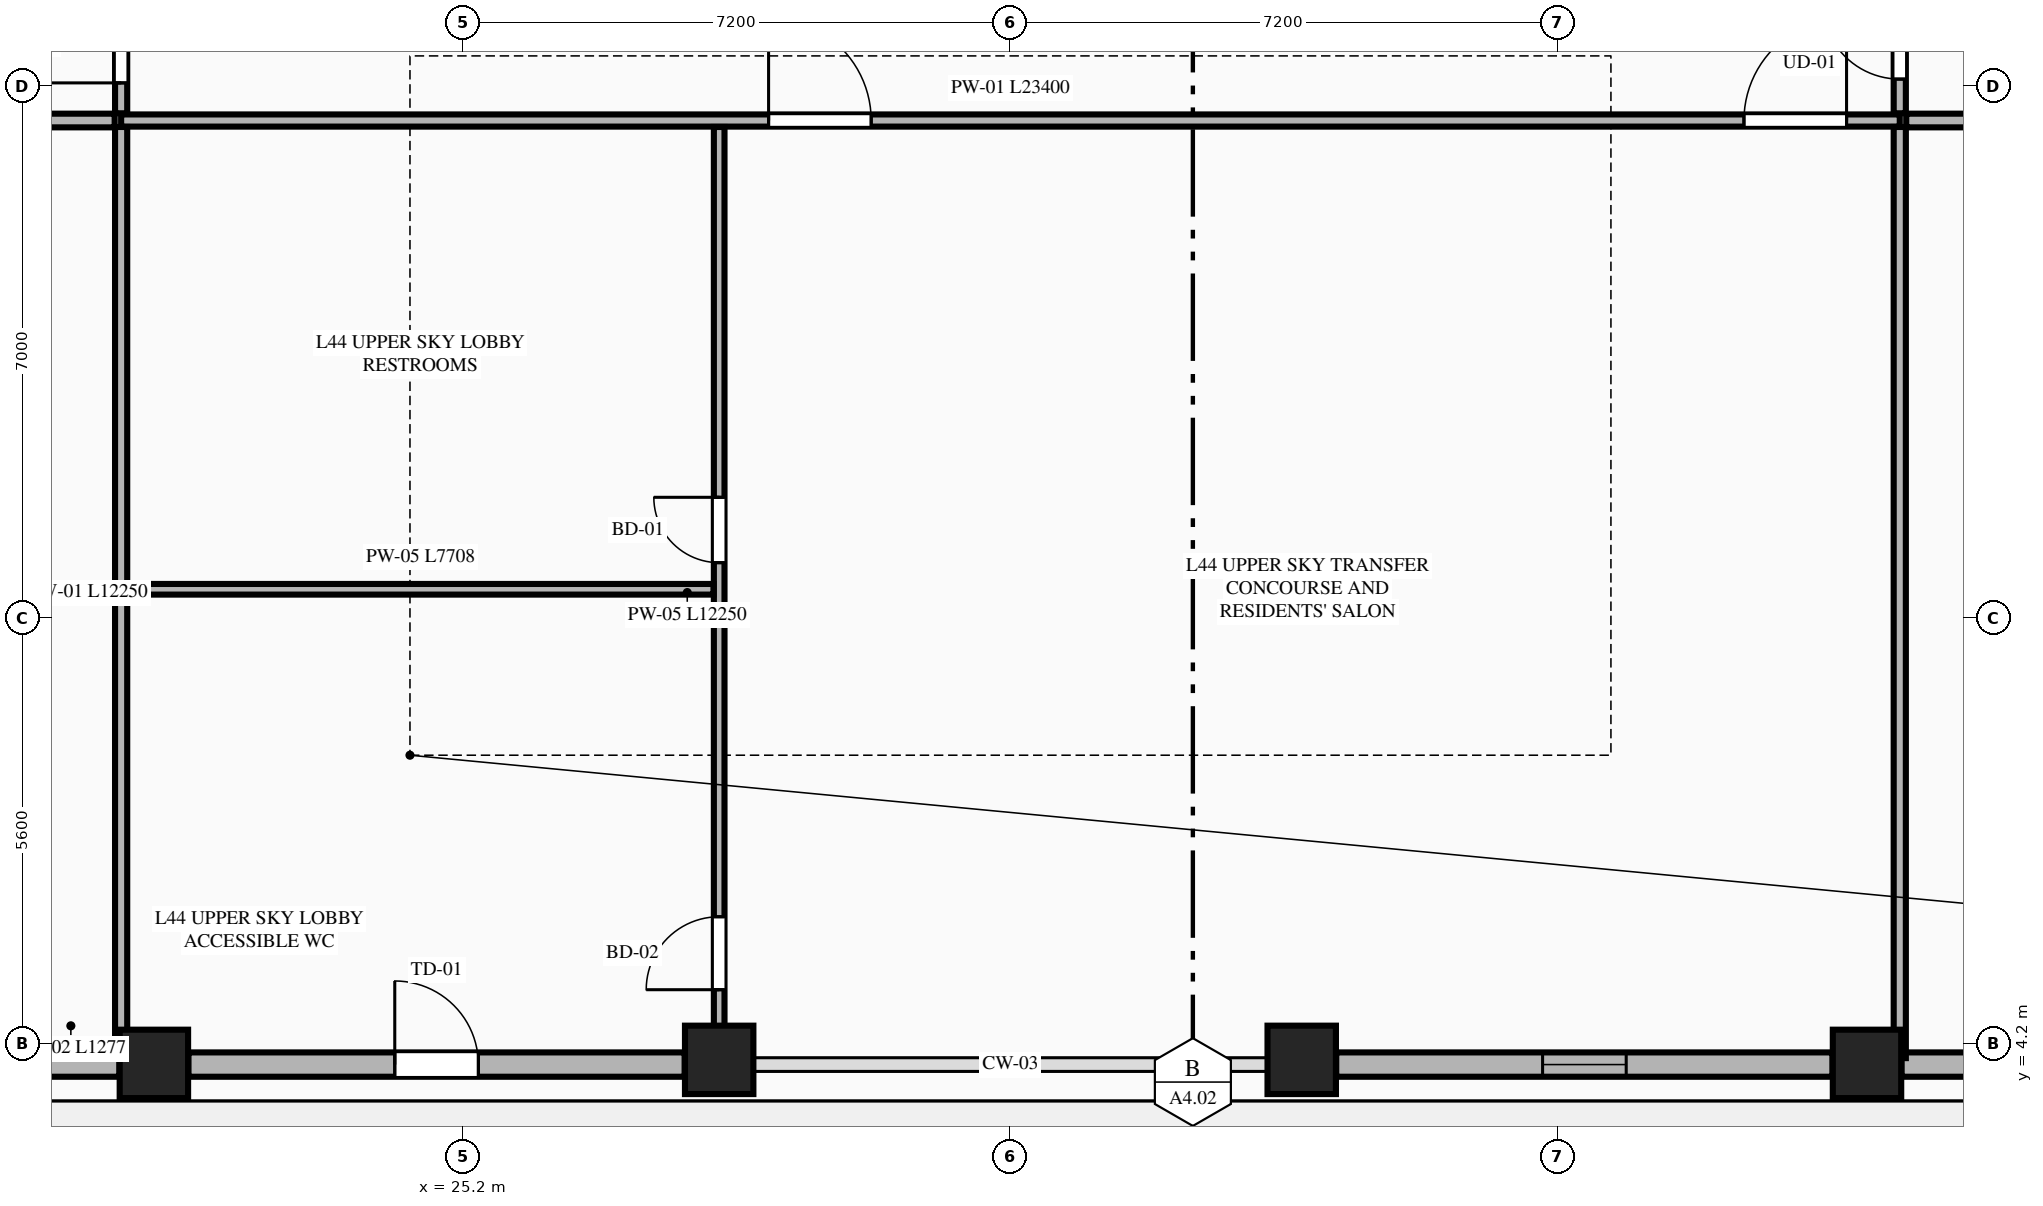
"""IFC4 building model, lengths in metres.
Left out: names, types, materials, properties, quantities, classifications, styles, units other than length and angle.
Written with IfcOpenShell. Run it as: python <this file> out.ifc"""

import sys

from ifc_helpers import new_model, si_unit, direction, frame, frame_2d, origin, origin_2d, place, context, subcontext, project, spatial, rectangle, extrude, element, fill, save


model = new_model("IFC4")
c1 = context("Model", 3, precision=1e-05, world=origin(), true_north=direction((0.0, 1.0)))
c2 = subcontext(c1, "Body", "Model", "MODEL_VIEW")
j1 = project(units=[si_unit("LENGTHUNIT", "METRE"), si_unit("PLANEANGLEUNIT", "RADIAN")], contexts=[c1])
p1 = place(None, origin())
s1 = spatial("IfcSite", under=j1, at=p1, CompositionType="ELEMENT")
p2 = place(p1, origin())
s2 = spatial("IfcBuilding", under=s1, at=p2, CompositionType="ELEMENT")
p3 = place(p2, frame((0.0, 0.0, 167.7)))
s3 = spatial("IfcBuildingStorey", under=s2, at=p3, CompositionType="ELEMENT", Elevation=167.7)
for number, where, z_axis, x_axis in (
    (1, (21.131, 3.939, 0.0), (0.0, 0.0, 1.0), (1.0, 0.0, 0.0)),
    (2, (28.568, 3.992, 0.0), (0.0, 0.0, 1.0), (1.0, 0.0, 0.0)),
    (3, (36.232, 3.992, 0.0), (0.0, 0.0, 1.0), (1.0, 0.0, 0.0)),
    (4, (43.669, 3.939, 0.0), (0.0, 0.0, 1.0), (1.0, 0.0, 0.0)),
):
    element("IfcColumn", number, at=place(p3, frame(where, z_axis=z_axis, x_axis=x_axis)), inside=s3, PredefinedType="COLUMN", context=c2, shape_type="SweptSolid", body=[
        extrude(rectangle(XDim=0.9, YDim=0.9, at=origin_2d()), origin(), (0.0, 0.0, 1.0), 4.2),
    ])
p4 = place(p3, frame((19.4, 3.93, 0.0), z_axis=(0.0, 0.0, 1.0), x_axis=(1.0, 0.0, 0.0)))
e5 = element("IfcWall", 5, at=p4, inside=s3, PredefinedType="STANDARD", context=c2, shape_type="SweptSolid", body=[
    extrude(rectangle(XDim=1.277, YDim=0.32, at=frame_2d((0.639, 0.0))), origin(), (0.0, 0.0, 1.0), 4.0),
])
p5 = place(p3, frame((21.585, 3.93, 0.0), z_axis=(0.0, 0.0, 1.0), x_axis=(1.0, 0.0, 0.0)))
e6 = element("IfcWall", 6, at=p5, inside=s3, PredefinedType="STANDARD", context=c2, shape_type="SweptSolid", body=[
    extrude(rectangle(XDim=6.529, YDim=0.32, at=frame_2d((3.265, 0.0))), origin(), (0.0, 0.0, 1.0), 2.59),
])
p6 = place(p5, frame((2.715, 0.0, 0.75)))
e7 = element("IfcOpeningElement", 7, at=p6, cuts=e6, PredefinedType="OPENING", context=c2, shape_type="SweptSolid", body=[
    extrude(rectangle(XDim=1.1, YDim=1.69, at=frame_2d((0.55, 0.845))), frame((0.0, 0.17, 0.0), z_axis=(0.0, -1.0, 0.0), x_axis=(1.0, 0.0, 0.0)), (0.0, 0.0, 1.0), 0.34),
])
p7 = place(p3, frame((36.686, 3.93, 0.0), z_axis=(0.0, 0.0, 1.0), x_axis=(1.0, 0.0, 0.0)))
e8 = element("IfcWall", 8, at=p7, inside=s3, PredefinedType="STANDARD", context=c2, shape_type="SweptSolid", body=[
    extrude(rectangle(XDim=6.529, YDim=0.32, at=frame_2d((3.265, 0.0))), origin(), (0.0, 0.0, 1.0), 2.59),
])
p8 = place(p7, frame((2.715, 0.0, 0.0)))
e9 = element("IfcOpeningElement", 9, at=p8, cuts=e8, PredefinedType="OPENING", context=c2, shape_type="SweptSolid", body=[
    extrude(rectangle(XDim=1.1, YDim=2.25, at=frame_2d((0.55, 1.125))), frame((0.0, 0.17, 0.0), z_axis=(0.0, -1.0, 0.0), x_axis=(1.0, 0.0, 0.0)), (0.0, 0.0, 1.0), 0.34),
])
p9 = place(p3, frame((44.123, 3.93, 0.0), z_axis=(0.0, 0.0, 1.0), x_axis=(1.0, 0.0, 0.0)))
e10 = element("IfcWall", 10, at=p9, inside=s3, PredefinedType="STANDARD", context=c2, shape_type="SweptSolid", body=[
    extrude(rectangle(XDim=1.277, YDim=0.32, at=frame_2d((0.638, 0.0))), origin(), (0.0, 0.0, 1.0), 4.0),
])
p10 = place(p3, frame((20.7, 16.35, 0.0), z_axis=(0.0, 0.0, 1.0), x_axis=(1.0, 0.0, 0.0)))
e11 = element("IfcWall", 11, at=p10, inside=s3, PredefinedType="PARTITIONING", context=c2, shape_type="SweptSolid", body=[
    extrude(rectangle(XDim=23.4, YDim=0.16, at=frame_2d((11.7, 0.0))), origin(), (0.0, 0.0, 1.0), 4.0),
])
p11 = place(p10, frame((8.518, 0.0, 0.0)))
e12 = element("IfcOpeningElement", 12, at=p11, cuts=e11, PredefinedType="OPENING", context=c2, shape_type="SweptSolid", body=[
    extrude(rectangle(XDim=1.35, YDim=2.35, at=frame_2d((0.675, 1.175))), frame((0.0, 0.09, 0.0), z_axis=(0.0, -1.0, 0.0), x_axis=(1.0, 0.0, 0.0)), (0.0, 0.0, 1.0), 0.18),
])
p12 = place(p10, frame((21.35, 0.0, 0.0)))
e13 = element("IfcOpeningElement", 13, at=p12, cuts=e11, PredefinedType="OPENING", context=c2, shape_type="SweptSolid", body=[
    extrude(rectangle(XDim=1.35, YDim=2.35, at=frame_2d((0.675, 1.175))), frame((0.0, 0.09, 0.0), z_axis=(0.0, -1.0, 0.0), x_axis=(1.0, 0.0, 0.0)), (0.0, 0.0, 1.0), 0.18),
])
p13 = place(p3, frame((28.568, 4.015, 0.0), z_axis=(0.0, 0.0, 1.0), x_axis=(0.0, 1.0, 0.0)))
e14 = element("IfcWall", 14, at=p13, inside=s3, PredefinedType="PLUMBINGWALL", context=c2, shape_type="SweptSolid", body=[
    extrude(rectangle(XDim=12.25, YDim=0.14, at=frame_2d((6.125, 0.0))), origin(), (0.0, 0.0, 1.0), 2.59),
])
p14 = place(p13, frame((6.518, 0.0, 0.0)))
e15 = element("IfcOpeningElement", 15, at=p14, cuts=e14, PredefinedType="OPENING", context=c2, shape_type="SweptSolid", body=[
    extrude(rectangle(XDim=0.86, YDim=2.1, at=frame_2d((0.43, 1.05))), frame((0.0, 0.08, 0.0), z_axis=(0.0, -1.0, 0.0), x_axis=(1.0, 0.0, 0.0)), (0.0, 0.0, 1.0), 0.16),
])
p15 = place(p13, frame((0.9, 0.0, 0.0)))
e16 = element("IfcOpeningElement", 16, at=p15, cuts=e14, PredefinedType="OPENING", context=c2, shape_type="SweptSolid", body=[
    extrude(rectangle(XDim=0.96, YDim=2.15, at=frame_2d((0.48, 1.075))), frame((0.0, 0.08, 0.0), z_axis=(0.0, -1.0, 0.0), x_axis=(1.0, 0.0, 0.0)), (0.0, 0.0, 1.0), 0.16),
])
p16 = place(p3, frame((20.785, 10.183, 0.0), z_axis=(0.0, 0.0, 1.0), x_axis=(1.0, 0.0, 0.0)))
e17 = element("IfcWall", 17, at=p16, inside=s3, PredefinedType="PLUMBINGWALL", context=c2, shape_type="SweptSolid", body=[
    extrude(rectangle(XDim=7.708, YDim=0.14, at=frame_2d((3.854, 0.0))), origin(), (0.0, 0.0, 1.0), 3.635),
])
for number, where, z_axis, x_axis in (
    (18, (20.7, 4.015, 0.0), (0.0, 0.0, 1.0), (0.0, 1.0, 0.0)),
    (19, (44.1, 4.015, 0.0), (0.0, 0.0, 1.0), (0.0, 1.0, 0.0)),
):
    element("IfcWall", number, at=place(p3, frame(where, z_axis=z_axis, x_axis=x_axis)), inside=s3, PredefinedType="PARTITIONING", context=c2, shape_type="SweptSolid", body=[
        extrude(rectangle(XDim=12.25, YDim=0.16, at=frame_2d((6.125, 0.0))), origin(), (0.0, 0.0, 1.0), 4.0),
    ])
for number, where, z_axis, x_axis in (
    (20, (12.25, 16.35, 0.0), (0.0, 0.0, 1.0), (1.0, 0.0, 0.0)),
    (21, (44.185, 16.35, 0.0), (0.0, 0.0, 1.0), (1.0, 0.0, 0.0)),
):
    element("IfcWall", number, at=place(p3, frame(where, z_axis=z_axis, x_axis=x_axis)), inside=s3, PredefinedType="PARTITIONING", context=c2, shape_type="SweptSolid", body=[
        extrude(rectangle(XDim=8.365, YDim=0.18, at=frame_2d((4.183, 0.0))), origin(), (0.0, 0.0, 1.0), 4.0),
    ])
p17 = place(p3, frame((20.7, 16.445, 0.0), z_axis=(0.0, 0.0, 1.0), x_axis=(0.0, 1.0, 0.0)))
e22 = element("IfcWall", 22, at=p17, inside=s3, PredefinedType="PARTITIONING", context=c2, shape_type="SweptSolid", body=[
    extrude(rectangle(XDim=19.06, YDim=0.16, at=frame_2d((9.53, 0.0))), origin(), (0.0, 0.0, 1.0), 4.0),
])
p18 = place(p17, frame((0.4, 0.0, 0.0)))
e23 = element("IfcOpeningElement", 23, at=p18, cuts=e22, PredefinedType="OPENING", context=c2, shape_type="SweptSolid", body=[
    extrude(rectangle(XDim=1.02, YDim=2.25, at=frame_2d((0.51, 1.125))), frame((0.0, 0.09, 0.0), z_axis=(0.0, -1.0, 0.0), x_axis=(1.0, 0.0, 0.0)), (0.0, 0.0, 1.0), 0.18),
])
p19 = place(p3, frame((44.1, 16.445, 0.0), z_axis=(0.0, 0.0, 1.0), x_axis=(0.0, 1.0, 0.0)))
e24 = element("IfcWall", 24, at=p19, inside=s3, PredefinedType="PARTITIONING", context=c2, shape_type="SweptSolid", body=[
    extrude(rectangle(XDim=19.06, YDim=0.16, at=frame_2d((9.53, 0.0))), origin(), (0.0, 0.0, 1.0), 4.0),
])
p20 = place(p19, frame((0.45, 0.0, 0.0)))
e25 = element("IfcOpeningElement", 25, at=p20, cuts=e24, PredefinedType="OPENING", context=c2, shape_type="SweptSolid", body=[
    extrude(rectangle(XDim=1.02, YDim=2.25, at=frame_2d((0.51, 1.125))), frame((0.0, 0.09, 0.0), z_axis=(0.0, -1.0, 0.0), x_axis=(1.0, 0.0, 0.0)), (0.0, 0.0, 1.0), 0.18),
])
p21 = place(p8, origin())
e26 = element("IfcDoor", 26, at=p21, inside=s3, OperationType="SINGLE_SWING_LEFT", PredefinedType="DOOR", context=c2, shape_type="SweptSolid", body=[
    extrude(rectangle(XDim=1.1, YDim=2.25, at=frame_2d((0.55, 1.125))), frame((0.0, 0.025, 0.0), z_axis=(0.0, -1.0, 0.0), x_axis=(1.0, 0.0, 0.0)), (0.0, 0.0, 1.0), 0.05),
])
fill(e9, e26)
p22 = place(p6, origin())
e27 = element("IfcWindow", 27, at=p22, inside=s3, PartitioningType="SINGLE_PANEL", PredefinedType="WINDOW", context=c2, shape_type="SweptSolid", body=[
    extrude(rectangle(XDim=1.1, YDim=1.69, at=frame_2d((0.55, 0.845))), frame((0.0, 0.03, 0.0), z_axis=(0.0, -1.0, 0.0), x_axis=(1.0, 0.0, 0.0)), (0.0, 0.0, 1.0), 0.06),
])
fill(e7, e27)
p23 = place(p14, origin())
e28 = element("IfcDoor", 28, at=p23, inside=s3, OperationType="SINGLE_SWING_RIGHT", PredefinedType="DOOR", context=c2, shape_type="SweptSolid", body=[
    extrude(rectangle(XDim=0.86, YDim=2.1, at=frame_2d((0.43, 1.05))), frame((0.0, 0.025, 0.0), z_axis=(0.0, -1.0, 0.0), x_axis=(1.0, 0.0, 0.0)), (0.0, 0.0, 1.0), 0.05),
])
fill(e15, e28)
p24 = place(p15, origin())
e29 = element("IfcDoor", 29, at=p24, inside=s3, OperationType="SINGLE_SWING_LEFT", PredefinedType="DOOR", context=c2, shape_type="SweptSolid", body=[
    extrude(rectangle(XDim=0.96, YDim=2.15, at=frame_2d((0.48, 1.075))), frame((0.0, 0.025, 0.0), z_axis=(0.0, -1.0, 0.0), x_axis=(1.0, 0.0, 0.0)), (0.0, 0.0, 1.0), 0.05),
])
fill(e16, e29)
p25 = place(p11, origin())
e30 = element("IfcDoor", 30, at=p25, inside=s3, OperationType="SINGLE_SWING_LEFT", PredefinedType="DOOR", context=c2, shape_type="SweptSolid", body=[
    extrude(rectangle(XDim=1.35, YDim=2.35, at=frame_2d((0.675, 1.175))), frame((0.0, 0.025, 0.0), z_axis=(0.0, -1.0, 0.0), x_axis=(1.0, 0.0, 0.0)), (0.0, 0.0, 1.0), 0.05),
])
fill(e12, e30)
p26 = place(p12, origin())
e31 = element("IfcDoor", 31, at=p26, inside=s3, OperationType="SINGLE_SWING_RIGHT", PredefinedType="DOOR", context=c2, shape_type="SweptSolid", body=[
    extrude(rectangle(XDim=1.35, YDim=2.35, at=frame_2d((0.675, 1.175))), frame((0.0, 0.025, 0.0), z_axis=(0.0, -1.0, 0.0), x_axis=(1.0, 0.0, 0.0)), (0.0, 0.0, 1.0), 0.05),
])
fill(e13, e31)
p27 = place(p18, origin())
e32 = element("IfcDoor", 32, at=p27, inside=s3, OperationType="SINGLE_SWING_LEFT", PredefinedType="DOOR", context=c2, shape_type="SweptSolid", body=[
    extrude(rectangle(XDim=1.02, YDim=2.25, at=frame_2d((0.51, 1.125))), frame((0.0, 0.025, 0.0), z_axis=(0.0, -1.0, 0.0), x_axis=(1.0, 0.0, 0.0)), (0.0, 0.0, 1.0), 0.05),
])
fill(e23, e32)
p28 = place(p20, origin())
e33 = element("IfcDoor", 33, at=p28, inside=s3, OperationType="SINGLE_SWING_RIGHT", PredefinedType="DOOR", context=c2, shape_type="SweptSolid", body=[
    extrude(rectangle(XDim=1.02, YDim=2.25, at=frame_2d((0.51, 1.125))), frame((0.0, 0.025, 0.0), z_axis=(0.0, -1.0, 0.0), x_axis=(1.0, 0.0, 0.0)), (0.0, 0.0, 1.0), 0.05),
])
fill(e25, e33)
save(model, sys.argv[1])
